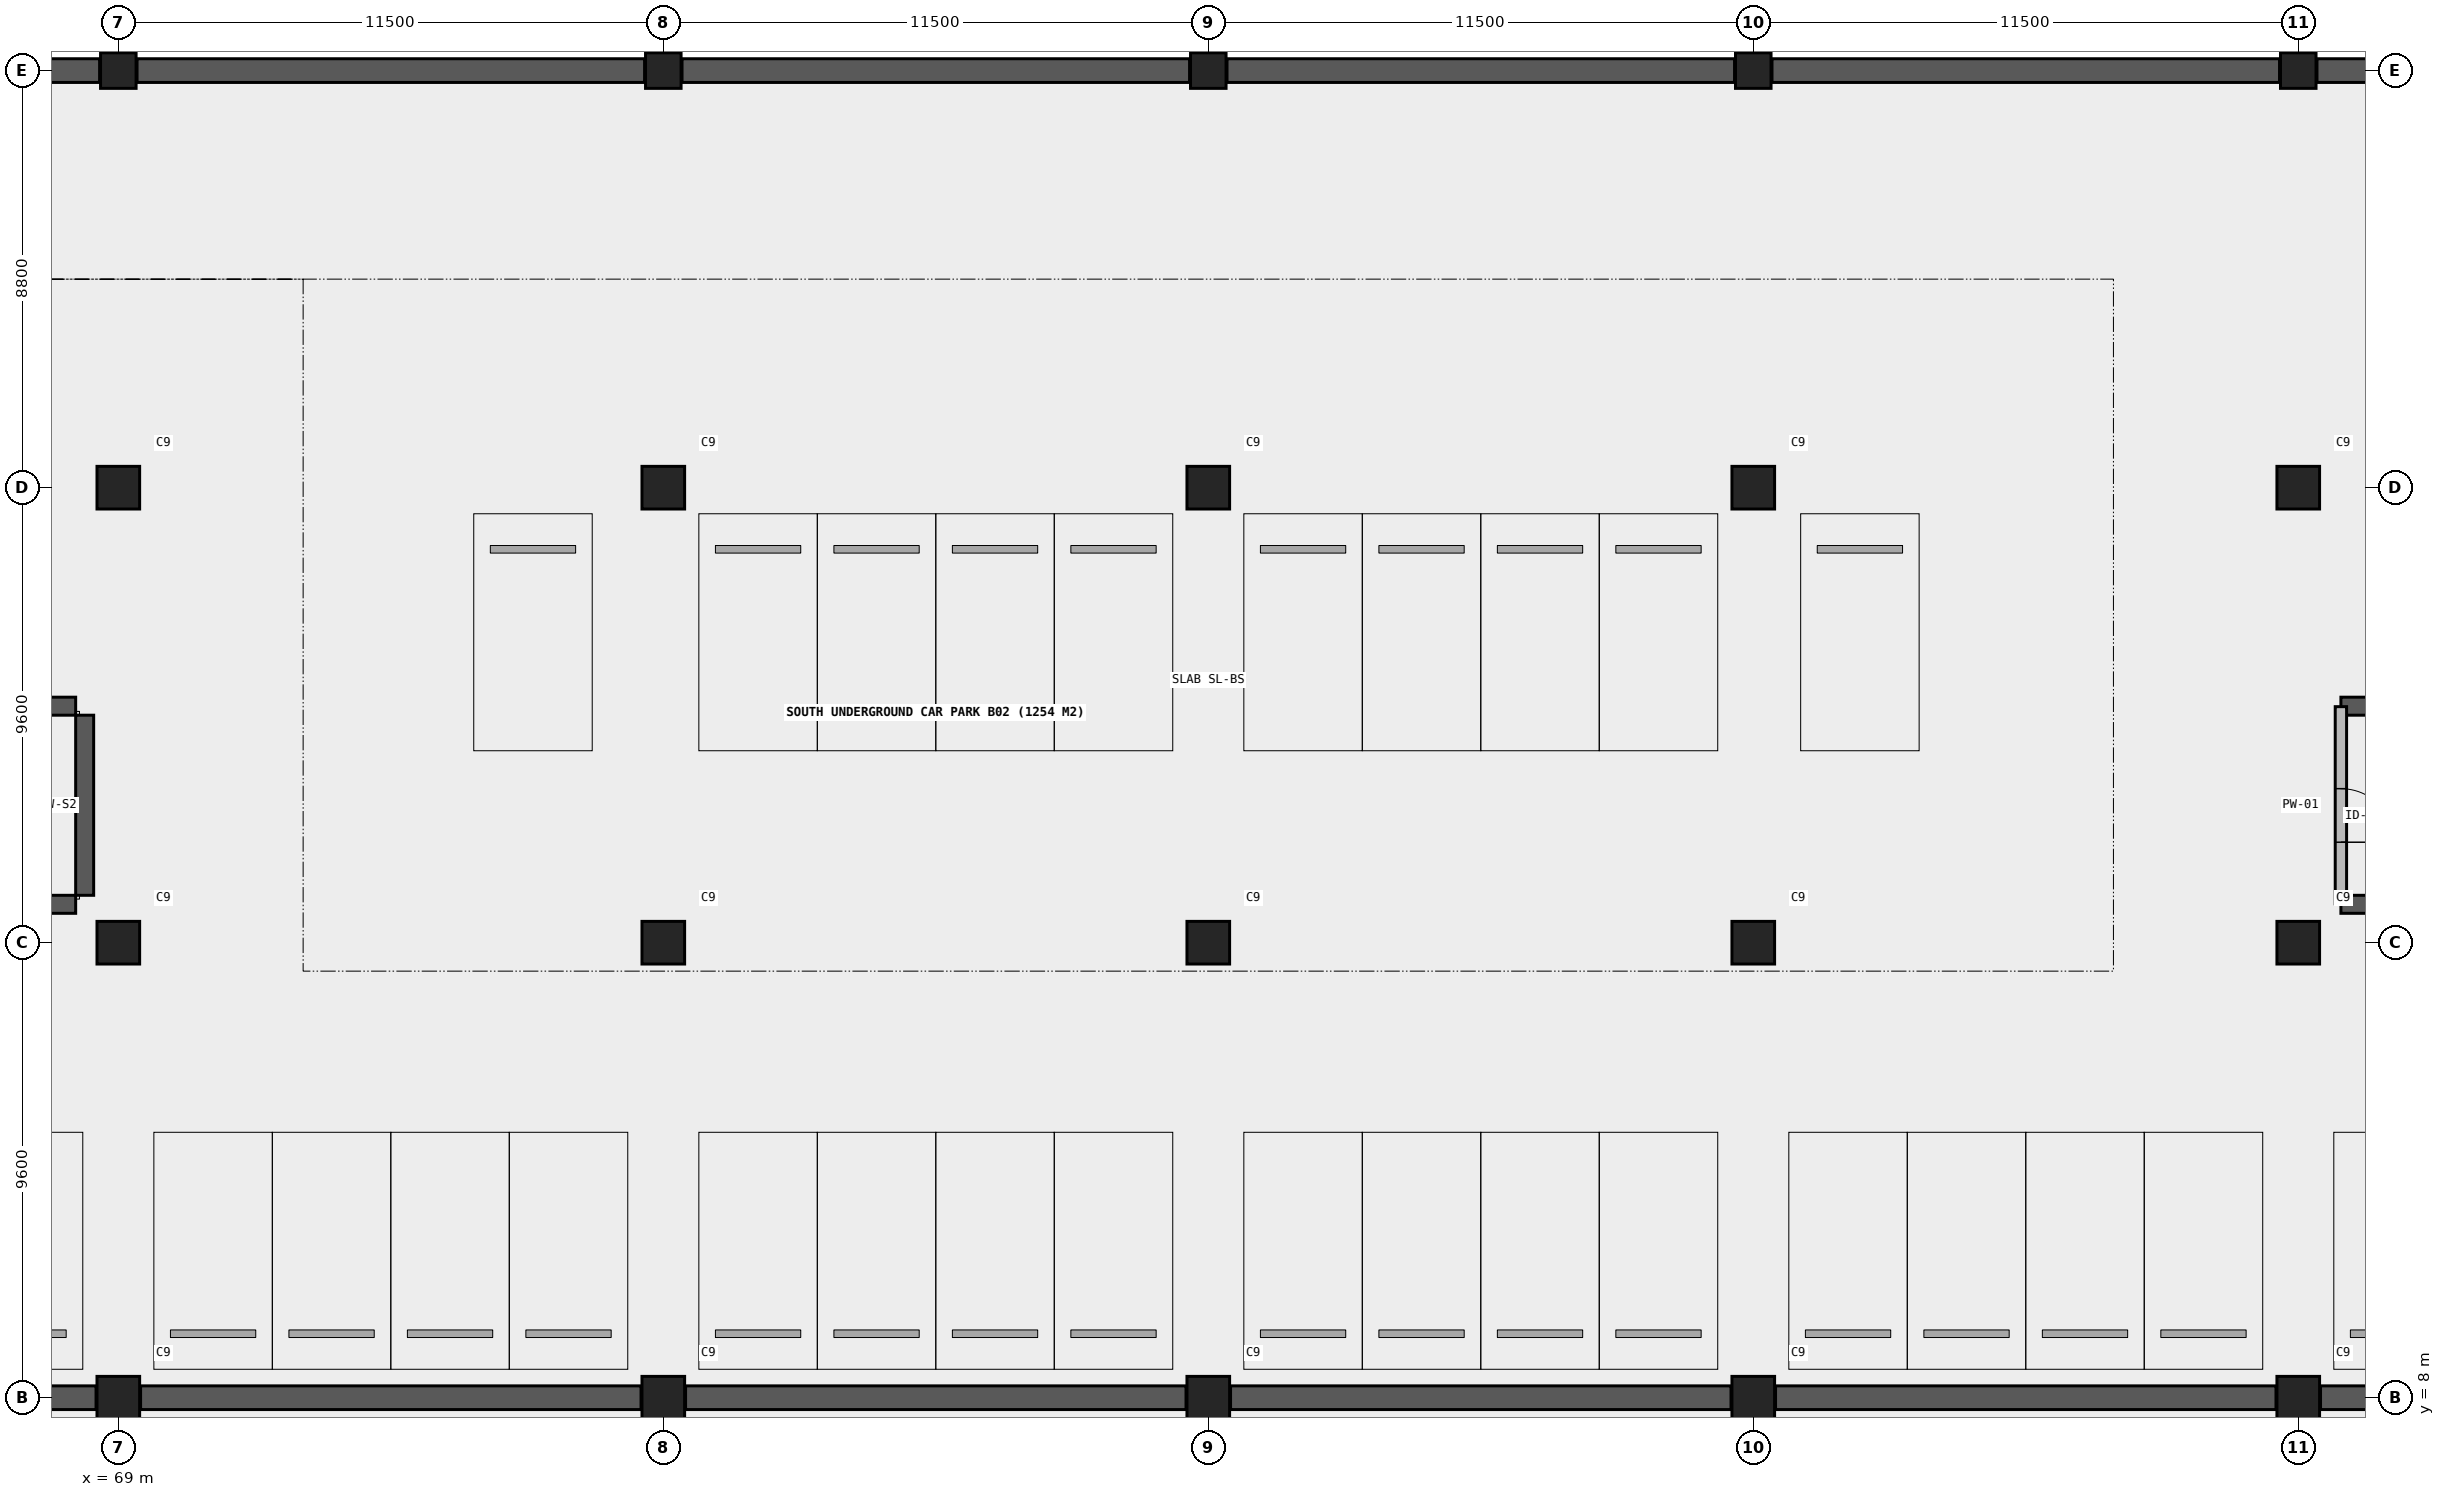
"""IFC4 building model, lengths in metres.
Left out: names, types, materials, properties, quantities, classifications, styles, units other than length and angle.
Written with IfcOpenShell. Run it as: python <this file> out.ifc"""

import sys

from ifc_helpers import new_model, si_unit, direction, frame, frame_2d, origin, origin_2d, place, context, subcontext, project, spatial, rectangle, circle, extrude, element, fill, save


model = new_model("IFC4")
c1 = context("Model", 3, precision=1e-05, world=origin(), true_north=direction((0.0, 1.0)))
c2 = subcontext(c1, "Body", "Model", "MODEL_VIEW")
j1 = project(units=[si_unit("LENGTHUNIT", "METRE"), si_unit("PLANEANGLEUNIT", "RADIAN")], contexts=[c1])
p1 = place(None, origin())
s1 = spatial("IfcSite", under=j1, at=p1, CompositionType="ELEMENT")
p2 = place(p1, origin())
s2 = spatial("IfcBuilding", under=s1, at=p2, CompositionType="ELEMENT")
p3 = place(p2, frame((0.0, 0.0, -8.4)))
s3 = spatial("IfcBuildingStorey", under=s2, at=p3, CompositionType="ELEMENT", Elevation=-8.4)
for number, where, z_axis, x_axis in (
    (1, (69.0, 8.0, 0.0), (0.0, 0.0, 1.0), (1.0, 0.0, 0.0)),
    (2, (69.0, 17.6, 0.0), (0.0, 0.0, 1.0), (1.0, 0.0, 0.0)),
    (3, (69.0, 27.2, 0.0), (0.0, 0.0, 1.0), (1.0, 0.0, 0.0)),
):
    element("IfcColumn", number, at=place(p3, frame(where, z_axis=z_axis, x_axis=x_axis)), inside=s3, PredefinedType="COLUMN", context=c2, shape_type="SweptSolid", body=[
        extrude(circle(Radius=0.45, at=origin_2d()), origin(), (0.0, 0.0, 1.0), 4.2),
    ])
p4 = place(p3, frame((69.0, 36.0, 0.0), z_axis=(0.0, 0.0, 1.0), x_axis=(1.0, 0.0, 0.0)))
e4 = element("IfcColumn", 4, at=p4, inside=s3, PredefinedType="COLUMN", context=c2, shape_type="SweptSolid", body=[
    extrude(rectangle(XDim=0.75, YDim=0.75, at=origin_2d()), origin(), (0.0, 0.0, 1.0), 4.2),
])
for number, where, z_axis, x_axis in (
    (5, (80.5, 8.0, 0.0), (0.0, 0.0, 1.0), (1.0, 0.0, 0.0)),
    (6, (80.5, 17.6, 0.0), (0.0, 0.0, 1.0), (1.0, 0.0, 0.0)),
    (7, (80.5, 27.2, 0.0), (0.0, 0.0, 1.0), (1.0, 0.0, 0.0)),
):
    element("IfcColumn", number, at=place(p3, frame(where, z_axis=z_axis, x_axis=x_axis)), inside=s3, PredefinedType="COLUMN", context=c2, shape_type="SweptSolid", body=[
        extrude(circle(Radius=0.45, at=origin_2d()), origin(), (0.0, 0.0, 1.0), 4.2),
    ])
p5 = place(p3, frame((80.5, 36.0, 0.0), z_axis=(0.0, 0.0, 1.0), x_axis=(1.0, 0.0, 0.0)))
e8 = element("IfcColumn", 8, at=p5, inside=s3, PredefinedType="COLUMN", context=c2, shape_type="SweptSolid", body=[
    extrude(rectangle(XDim=0.75, YDim=0.75, at=origin_2d()), origin(), (0.0, 0.0, 1.0), 4.2),
])
for number, where, z_axis, x_axis in (
    (9, (92.0, 8.0, 0.0), (0.0, 0.0, 1.0), (1.0, 0.0, 0.0)),
    (10, (92.0, 17.6, 0.0), (0.0, 0.0, 1.0), (1.0, 0.0, 0.0)),
    (11, (92.0, 27.2, 0.0), (0.0, 0.0, 1.0), (1.0, 0.0, 0.0)),
):
    element("IfcColumn", number, at=place(p3, frame(where, z_axis=z_axis, x_axis=x_axis)), inside=s3, PredefinedType="COLUMN", context=c2, shape_type="SweptSolid", body=[
        extrude(circle(Radius=0.45, at=origin_2d()), origin(), (0.0, 0.0, 1.0), 4.2),
    ])
p6 = place(p3, frame((92.0, 36.0, 0.0), z_axis=(0.0, 0.0, 1.0), x_axis=(1.0, 0.0, 0.0)))
e12 = element("IfcColumn", 12, at=p6, inside=s3, PredefinedType="COLUMN", context=c2, shape_type="SweptSolid", body=[
    extrude(rectangle(XDim=0.75, YDim=0.75, at=origin_2d()), origin(), (0.0, 0.0, 1.0), 4.2),
])
for number, where, z_axis, x_axis in (
    (13, (103.5, 8.0, 0.0), (0.0, 0.0, 1.0), (1.0, 0.0, 0.0)),
    (14, (103.5, 17.6, 0.0), (0.0, 0.0, 1.0), (1.0, 0.0, 0.0)),
    (15, (103.5, 27.2, 0.0), (0.0, 0.0, 1.0), (1.0, 0.0, 0.0)),
):
    element("IfcColumn", number, at=place(p3, frame(where, z_axis=z_axis, x_axis=x_axis)), inside=s3, PredefinedType="COLUMN", context=c2, shape_type="SweptSolid", body=[
        extrude(circle(Radius=0.45, at=origin_2d()), origin(), (0.0, 0.0, 1.0), 4.2),
    ])
p7 = place(p3, frame((103.5, 36.0, 0.0), z_axis=(0.0, 0.0, 1.0), x_axis=(1.0, 0.0, 0.0)))
e16 = element("IfcColumn", 16, at=p7, inside=s3, PredefinedType="COLUMN", context=c2, shape_type="SweptSolid", body=[
    extrude(rectangle(XDim=0.75, YDim=0.75, at=origin_2d()), origin(), (0.0, 0.0, 1.0), 4.2),
])
for number, where, z_axis, x_axis in (
    (17, (115.0, 8.0, 0.0), (0.0, 0.0, 1.0), (1.0, 0.0, 0.0)),
    (18, (115.0, 17.6, 0.0), (0.0, 0.0, 1.0), (1.0, 0.0, 0.0)),
    (19, (115.0, 27.2, 0.0), (0.0, 0.0, 1.0), (1.0, 0.0, 0.0)),
):
    element("IfcColumn", number, at=place(p3, frame(where, z_axis=z_axis, x_axis=x_axis)), inside=s3, PredefinedType="COLUMN", context=c2, shape_type="SweptSolid", body=[
        extrude(circle(Radius=0.45, at=origin_2d()), origin(), (0.0, 0.0, 1.0), 4.2),
    ])
p8 = place(p3, frame((115.0, 36.0, 0.0), z_axis=(0.0, 0.0, 1.0), x_axis=(1.0, 0.0, 0.0)))
e20 = element("IfcColumn", 20, at=p8, inside=s3, PredefinedType="COLUMN", context=c2, shape_type="SweptSolid", body=[
    extrude(rectangle(XDim=0.75, YDim=0.75, at=origin_2d()), origin(), (0.0, 0.0, 1.0), 4.2),
])
for number, where, z_axis, x_axis in (
    (21, (57.97, 8.0, 0.0), (0.0, 0.0, 1.0), (1.0, 0.0, 0.0)),
    (22, (69.47, 8.0, 0.0), (0.0, 0.0, 1.0), (1.0, 0.0, 0.0)),
    (23, (80.97, 8.0, 0.0), (0.0, 0.0, 1.0), (1.0, 0.0, 0.0)),
    (24, (92.47, 8.0, 0.0), (0.0, 0.0, 1.0), (1.0, 0.0, 0.0)),
    (25, (103.97, 8.0, 0.0), (0.0, 0.0, 1.0), (1.0, 0.0, 0.0)),
    (26, (115.47, 8.0, 0.0), (0.0, 0.0, 1.0), (1.0, 0.0, 0.0)),
):
    element("IfcWall", number, at=place(p3, frame(where, z_axis=z_axis, x_axis=x_axis)), inside=s3, PredefinedType="SHEAR", context=c2, shape_type="SweptSolid", body=[
        extrude(rectangle(XDim=10.56, YDim=0.5, at=frame_2d((5.28, 0.0))), origin(), (0.0, 0.0, 1.0), 4.2),
    ])
for number, where, z_axis, x_axis in (
    (27, (57.895, 36.0, 0.0), (0.0, 0.0, 1.0), (1.0, 0.0, 0.0)),
    (28, (69.395, 36.0, 0.0), (0.0, 0.0, 1.0), (1.0, 0.0, 0.0)),
    (29, (80.895, 36.0, 0.0), (0.0, 0.0, 1.0), (1.0, 0.0, 0.0)),
    (30, (92.395, 36.0, 0.0), (0.0, 0.0, 1.0), (1.0, 0.0, 0.0)),
    (31, (103.895, 36.0, 0.0), (0.0, 0.0, 1.0), (1.0, 0.0, 0.0)),
    (32, (115.395, 36.0, 0.0), (0.0, 0.0, 1.0), (1.0, 0.0, 0.0)),
):
    element("IfcWall", number, at=place(p3, frame(where, z_axis=z_axis, x_axis=x_axis)), inside=s3, PredefinedType="SHEAR", context=c2, shape_type="SweptSolid", body=[
        extrude(rectangle(XDim=10.71, YDim=0.5, at=frame_2d((5.355, 0.0))), origin(), (0.0, 0.0, 1.0), 4.2),
    ])
p9 = place(p3, frame((58.7, 18.41, 0.0), z_axis=(0.0, 0.0, 1.0), x_axis=(1.0, 0.0, 0.0)))
e33 = element("IfcWall", 33, at=p9, inside=s3, PredefinedType="SHEAR", context=c2, shape_type="SweptSolid", body=[
    extrude(rectangle(XDim=9.4, YDim=0.38, at=frame_2d((4.7, 0.0))), origin(), (0.0, 0.0, 1.0), 4.2),
])
p10 = place(p3, frame((58.7, 22.59, 0.0), z_axis=(0.0, 0.0, 1.0), x_axis=(1.0, 0.0, 0.0)))
e34 = element("IfcWall", 34, at=p10, inside=s3, PredefinedType="SHEAR", context=c2, shape_type="SweptSolid", body=[
    extrude(rectangle(XDim=9.4, YDim=0.38, at=frame_2d((4.7, 0.0))), origin(), (0.0, 0.0, 1.0), 4.2),
])
p11 = place(p10, frame((0.55, 0.0, 0.0)))
e35 = element("IfcOpeningElement", 35, at=p11, cuts=e34, PredefinedType="OPENING", context=c2, shape_type="SweptSolid", body=[
    extrude(rectangle(XDim=1.13, YDim=2.15, at=frame_2d((0.565, 1.075))), frame((0.0, 0.2, 0.0), z_axis=(0.0, -1.0, 0.0), x_axis=(1.0, 0.0, 0.0)), (0.0, 0.0, 1.0), 0.4),
])
p12 = place(p3, frame((68.29, 18.6, 0.0), z_axis=(0.0, 0.0, 1.0), x_axis=(0.0, 1.0, 0.0)))
e36 = element("IfcWall", 36, at=p12, inside=s3, PredefinedType="SHEAR", context=c2, shape_type="SweptSolid", body=[
    extrude(rectangle(XDim=3.8, YDim=0.38, at=frame_2d((1.9, 0.0))), origin(), (0.0, 0.0, 1.0), 4.2),
])
p13 = place(p3, frame((115.9, 18.41, 0.0), z_axis=(0.0, 0.0, 1.0), x_axis=(1.0, 0.0, 0.0)))
e37 = element("IfcWall", 37, at=p13, inside=s3, PredefinedType="SHEAR", context=c2, shape_type="SweptSolid", body=[
    extrude(rectangle(XDim=9.4, YDim=0.38, at=frame_2d((4.7, 0.0))), origin(), (0.0, 0.0, 1.0), 4.2),
])
p14 = place(p3, frame((115.9, 22.59, 0.0), z_axis=(0.0, 0.0, 1.0), x_axis=(1.0, 0.0, 0.0)))
e38 = element("IfcWall", 38, at=p14, inside=s3, PredefinedType="SHEAR", context=c2, shape_type="SweptSolid", body=[
    extrude(rectangle(XDim=9.4, YDim=0.38, at=frame_2d((4.7, 0.0))), origin(), (0.0, 0.0, 1.0), 4.2),
])
p15 = place(p14, frame((0.55, 0.0, 0.0)))
e39 = element("IfcOpeningElement", 39, at=p15, cuts=e38, PredefinedType="OPENING", context=c2, shape_type="SweptSolid", body=[
    extrude(rectangle(XDim=1.13, YDim=2.15, at=frame_2d((0.565, 1.075))), frame((0.0, 0.2, 0.0), z_axis=(0.0, -1.0, 0.0), x_axis=(1.0, 0.0, 0.0)), (0.0, 0.0, 1.0), 0.4),
])
p16 = place(p3, frame((115.9, 18.42, 0.0), z_axis=(0.0, 0.0, 1.0), x_axis=(0.0, 1.0, 0.0)))
e40 = element("IfcWall", 40, at=p16, inside=s3, PredefinedType="SOLIDWALL", context=c2, shape_type="SweptSolid", body=[
    extrude(rectangle(XDim=4.16, YDim=0.24, at=frame_2d((2.08, 0.0))), origin(), (0.0, 0.0, 1.0), 3.9),
])
p17 = place(p16, frame((1.3, 0.0, 0.0)))
e41 = element("IfcOpeningElement", 41, at=p17, cuts=e40, PredefinedType="OPENING", context=c2, shape_type="SweptSolid", body=[
    extrude(rectangle(XDim=1.13, YDim=2.15, at=frame_2d((0.565, 1.075))), frame((0.0, 0.13, 0.0), z_axis=(0.0, -1.0, 0.0), x_axis=(1.0, 0.0, 0.0)), (0.0, 0.0, 1.0), 0.26),
])
p18 = place(p17, frame((0.565, 0.0, 0.0), z_axis=(0.0, 0.0, 1.0), x_axis=(-1.0, 0.0, 0.0)))
e42 = element("IfcDoor", 42, at=p18, inside=s3, OperationType="SINGLE_SWING_LEFT", PredefinedType="DOOR", context=c2, shape_type="SweptSolid", body=[
    extrude(rectangle(XDim=1.13, YDim=2.15, at=frame_2d((0.0, 1.075))), frame((0.0, 0.025, 0.0), z_axis=(0.0, -1.0, 0.0), x_axis=(1.0, 0.0, 0.0)), (0.0, 0.0, 1.0), 0.05),
])
fill(e41, e42)
save(model, sys.argv[1])
